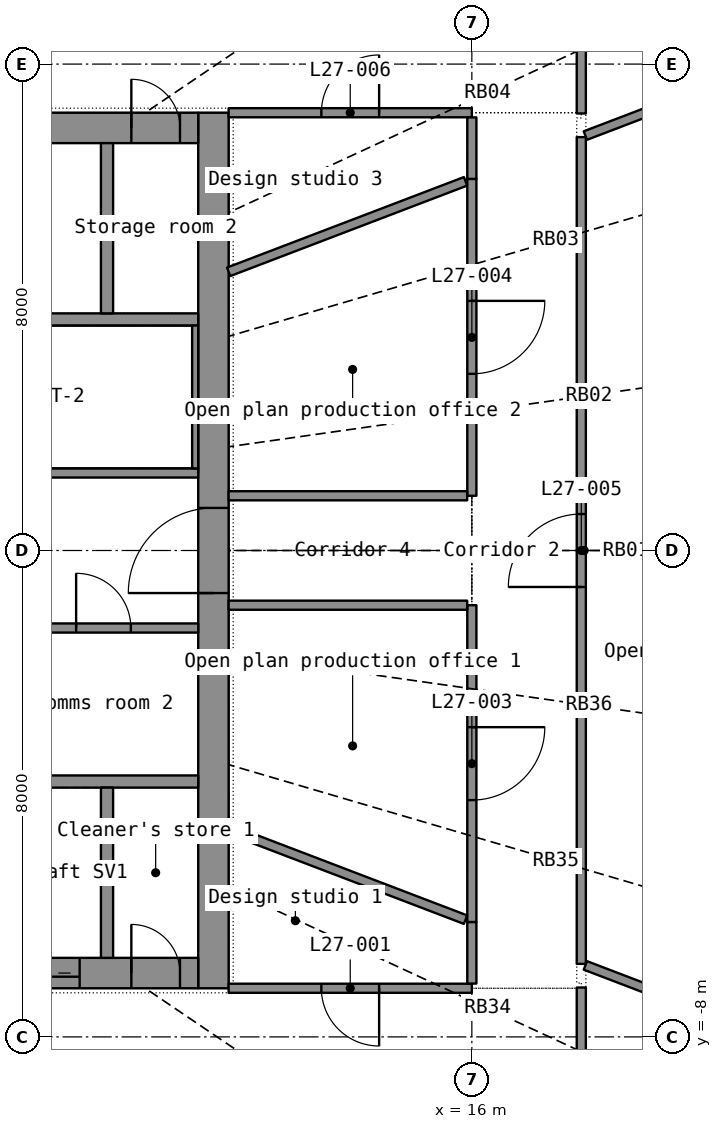
"""IFC4 building model, lengths in metres.
Left out: names, types, materials, properties, quantities, classifications, styles, units other than length and angle.
Written with IfcOpenShell. Run it as: python <this file> out.ifc"""

import sys

from ifc_helpers import new_model, si_unit, direction, frame, frame_2d, origin, place, context, subcontext, project, spatial, rectangle, extrude, element, fill, save


model = new_model("IFC4")
c1 = context("Model", 3, precision=1e-05, world=origin(), true_north=direction((0.0, 1.0)))
c2 = subcontext(c1, "Body", "Model", "MODEL_VIEW")
j1 = project(units=[si_unit("LENGTHUNIT", "METRE"), si_unit("PLANEANGLEUNIT", "RADIAN")], contexts=[c1])
p1 = place(None, origin())
s1 = spatial("IfcSite", under=j1, at=p1, CompositionType="ELEMENT")
p2 = place(p1, origin())
s2 = spatial("IfcBuilding", under=s1, at=p2, CompositionType="ELEMENT")
p3 = place(p2, frame((0.0, 0.0, 115.6)))
s3 = spatial("IfcBuildingStorey", under=s2, at=p3, CompositionType="ELEMENT", Elevation=115.6)
p4 = place(p3, frame((11.75, -7.2, 0.0), z_axis=(0.0, 0.0, 1.0), x_axis=(0.0, 1.0, 0.0)))
e1 = element("IfcWall", 1, at=p4, inside=s3, PredefinedType="SHEAR", context=c2, shape_type="SweptSolid", body=[
    extrude(rectangle(XDim=14.4, YDim=0.5, at=frame_2d((7.2, 0.0))), origin(), (0.0, 0.0, 1.0), 3.3),
])
p5 = place(p4, frame((6.5, 0.0, 0.0)))
e2 = element("IfcOpeningElement", 2, at=p5, cuts=e1, PredefinedType="OPENING", context=c2, shape_type="SweptSolid", body=[
    extrude(rectangle(XDim=1.4, YDim=2.2, at=frame_2d((0.7, 1.1))), frame((0.0, 0.26, 0.0), z_axis=(0.0, -1.0, 0.0), x_axis=(1.0, 0.0, 0.0)), (0.0, 0.0, 1.0), 0.52),
])
p6 = place(p3, frame((-11.5, -6.95, 0.0), z_axis=(0.0, 0.0, 1.0), x_axis=(1.0, 0.0, 0.0)))
e3 = element("IfcWall", 3, at=p6, inside=s3, PredefinedType="SHEAR", context=c2, shape_type="SweptSolid", body=[
    extrude(rectangle(XDim=23.0, YDim=0.5, at=frame_2d((11.5, 0.0))), origin(), (0.0, 0.0, 1.0), 3.3),
])
p7 = place(p6, frame((1.95, 0.0, 0.0)))
e4 = element("IfcOpeningElement", 4, at=p7, cuts=e3, PredefinedType="OPENING", context=c2, shape_type="SweptSolid", body=[
    extrude(rectangle(XDim=1.1, YDim=2.2, at=frame_2d((0.55, 1.1))), frame((0.0, 0.26, 0.0), z_axis=(0.0, -1.0, 0.0), x_axis=(1.0, 0.0, 0.0)), (0.0, 0.0, 1.0), 0.52),
])
p8 = place(p6, frame((3.95, 0.0, 0.0)))
e5 = element("IfcOpeningElement", 5, at=p8, cuts=e3, PredefinedType="OPENING", context=c2, shape_type="SweptSolid", body=[
    extrude(rectangle(XDim=1.1, YDim=2.2, at=frame_2d((0.55, 1.1))), frame((0.0, 0.26, 0.0), z_axis=(0.0, -1.0, 0.0), x_axis=(1.0, 0.0, 0.0)), (0.0, 0.0, 1.0), 0.52),
])
p9 = place(p6, frame((5.95, 0.0, 0.0)))
e6 = element("IfcOpeningElement", 6, at=p9, cuts=e3, PredefinedType="OPENING", context=c2, shape_type="SweptSolid", body=[
    extrude(rectangle(XDim=1.1, YDim=2.2, at=frame_2d((0.55, 1.1))), frame((0.0, 0.26, 0.0), z_axis=(0.0, -1.0, 0.0), x_axis=(1.0, 0.0, 0.0)), (0.0, 0.0, 1.0), 0.52),
])
p10 = place(p6, frame((7.95, 0.0, 0.0)))
e7 = element("IfcOpeningElement", 7, at=p10, cuts=e3, PredefinedType="OPENING", context=c2, shape_type="SweptSolid", body=[
    extrude(rectangle(XDim=1.1, YDim=2.2, at=frame_2d((0.55, 1.1))), frame((0.0, 0.26, 0.0), z_axis=(0.0, -1.0, 0.0), x_axis=(1.0, 0.0, 0.0)), (0.0, 0.0, 1.0), 0.52),
])
p11 = place(p6, frame((9.95, 0.0, 0.0)))
e8 = element("IfcOpeningElement", 8, at=p11, cuts=e3, PredefinedType="OPENING", context=c2, shape_type="SweptSolid", body=[
    extrude(rectangle(XDim=1.1, YDim=2.2, at=frame_2d((0.55, 1.1))), frame((0.0, 0.26, 0.0), z_axis=(0.0, -1.0, 0.0), x_axis=(1.0, 0.0, 0.0)), (0.0, 0.0, 1.0), 0.52),
])
p12 = place(p6, frame((11.95, 0.0, 0.0)))
e9 = element("IfcOpeningElement", 9, at=p12, cuts=e3, PredefinedType="OPENING", context=c2, shape_type="SweptSolid", body=[
    extrude(rectangle(XDim=1.1, YDim=2.2, at=frame_2d((0.55, 1.1))), frame((0.0, 0.26, 0.0), z_axis=(0.0, -1.0, 0.0), x_axis=(1.0, 0.0, 0.0)), (0.0, 0.0, 1.0), 0.52),
])
p13 = place(p6, frame((13.95, 0.0, 0.0)))
e10 = element("IfcOpeningElement", 10, at=p13, cuts=e3, PredefinedType="OPENING", context=c2, shape_type="SweptSolid", body=[
    extrude(rectangle(XDim=1.1, YDim=2.2, at=frame_2d((0.55, 1.1))), frame((0.0, 0.26, 0.0), z_axis=(0.0, -1.0, 0.0), x_axis=(1.0, 0.0, 0.0)), (0.0, 0.0, 1.0), 0.52),
])
p14 = place(p6, frame((15.95, 0.0, 0.0)))
e11 = element("IfcOpeningElement", 11, at=p14, cuts=e3, PredefinedType="OPENING", context=c2, shape_type="SweptSolid", body=[
    extrude(rectangle(XDim=1.1, YDim=2.2, at=frame_2d((0.55, 1.1))), frame((0.0, 0.26, 0.0), z_axis=(0.0, -1.0, 0.0), x_axis=(1.0, 0.0, 0.0)), (0.0, 0.0, 1.0), 0.52),
])
p15 = place(p6, frame((19.95, 0.0, 0.0)))
e12 = element("IfcOpeningElement", 12, at=p15, cuts=e3, PredefinedType="OPENING", context=c2, shape_type="SweptSolid", body=[
    extrude(rectangle(XDim=1.1, YDim=2.2, at=frame_2d((0.55, 1.1))), frame((0.0, 0.26, 0.0), z_axis=(0.0, -1.0, 0.0), x_axis=(1.0, 0.0, 0.0)), (0.0, 0.0, 1.0), 0.52),
])
p16 = place(p6, frame((0.3, 0.0, 0.0)))
e13 = element("IfcOpeningElement", 13, at=p16, cuts=e3, PredefinedType="OPENING", context=c2, shape_type="SweptSolid", body=[
    extrude(rectangle(XDim=0.8, YDim=2.05, at=frame_2d((0.4, 1.025))), frame((0.0, 0.26, 0.0), z_axis=(0.0, -1.0, 0.0), x_axis=(1.0, 0.0, 0.0)), (0.0, 0.0, 1.0), 0.52),
])
p17 = place(p6, frame((21.9, 0.0, 0.0)))
e14 = element("IfcOpeningElement", 14, at=p17, cuts=e3, PredefinedType="OPENING", context=c2, shape_type="SweptSolid", body=[
    extrude(rectangle(XDim=0.8, YDim=2.05, at=frame_2d((0.4, 1.025))), frame((0.0, 0.26, 0.0), z_axis=(0.0, -1.0, 0.0), x_axis=(1.0, 0.0, 0.0)), (0.0, 0.0, 1.0), 0.52),
])
p18 = place(p3, frame((-11.5, 6.95, 0.0), z_axis=(0.0, 0.0, 1.0), x_axis=(1.0, 0.0, 0.0)))
e15 = element("IfcWall", 15, at=p18, inside=s3, PredefinedType="SHEAR", context=c2, shape_type="SweptSolid", body=[
    extrude(rectangle(XDim=23.0, YDim=0.5, at=frame_2d((11.5, 0.0))), origin(), (0.0, 0.0, 1.0), 3.3),
])
p19 = place(p18, frame((1.95, 0.0, 0.0)))
e16 = element("IfcOpeningElement", 16, at=p19, cuts=e15, PredefinedType="OPENING", context=c2, shape_type="SweptSolid", body=[
    extrude(rectangle(XDim=1.1, YDim=2.2, at=frame_2d((0.55, 1.1))), frame((0.0, 0.26, 0.0), z_axis=(0.0, -1.0, 0.0), x_axis=(1.0, 0.0, 0.0)), (0.0, 0.0, 1.0), 0.52),
])
p20 = place(p18, frame((8.05, 0.0, 0.0)))
e17 = element("IfcOpeningElement", 17, at=p20, cuts=e15, PredefinedType="OPENING", context=c2, shape_type="SweptSolid", body=[
    extrude(rectangle(XDim=0.9, YDim=2.1, at=frame_2d((0.45, 1.05))), frame((0.0, 0.26, 0.0), z_axis=(0.0, -1.0, 0.0), x_axis=(1.0, 0.0, 0.0)), (0.0, 0.0, 1.0), 0.52),
])
p21 = place(p18, frame((13.05, 0.0, 0.0)))
e18 = element("IfcOpeningElement", 18, at=p21, cuts=e15, PredefinedType="OPENING", context=c2, shape_type="SweptSolid", body=[
    extrude(rectangle(XDim=0.9, YDim=2.1, at=frame_2d((0.45, 1.05))), frame((0.0, 0.26, 0.0), z_axis=(0.0, -1.0, 0.0), x_axis=(1.0, 0.0, 0.0)), (0.0, 0.0, 1.0), 0.52),
])
p22 = place(p18, frame((18.05, 0.0, 0.0)))
e19 = element("IfcOpeningElement", 19, at=p22, cuts=e15, PredefinedType="OPENING", context=c2, shape_type="SweptSolid", body=[
    extrude(rectangle(XDim=0.9, YDim=2.1, at=frame_2d((0.45, 1.05))), frame((0.0, 0.26, 0.0), z_axis=(0.0, -1.0, 0.0), x_axis=(1.0, 0.0, 0.0)), (0.0, 0.0, 1.0), 0.52),
])
p23 = place(p18, frame((0.3, 0.0, 0.0)))
e20 = element("IfcOpeningElement", 20, at=p23, cuts=e15, PredefinedType="OPENING", context=c2, shape_type="SweptSolid", body=[
    extrude(rectangle(XDim=0.8, YDim=2.05, at=frame_2d((0.4, 1.025))), frame((0.0, 0.26, 0.0), z_axis=(0.0, -1.0, 0.0), x_axis=(1.0, 0.0, 0.0)), (0.0, 0.0, 1.0), 0.52),
])
p24 = place(p18, frame((21.9, 0.0, 0.0)))
e21 = element("IfcOpeningElement", 21, at=p24, cuts=e15, PredefinedType="OPENING", context=c2, shape_type="SweptSolid", body=[
    extrude(rectangle(XDim=0.8, YDim=2.05, at=frame_2d((0.4, 1.025))), frame((0.0, 0.26, 0.0), z_axis=(0.0, -1.0, 0.0), x_axis=(1.0, 0.0, 0.0)), (0.0, 0.0, 1.0), 0.52),
])
for number, where, z_axis, x_axis in (
    (22, (-11.5, -3.8, 0.0), (0.0, 0.0, 1.0), (1.0, 0.0, 0.0)),
    (23, (-11.5, 3.8, 0.0), (0.0, 0.0, 1.0), (1.0, 0.0, 0.0)),
):
    element("IfcWall", number, at=place(p3, frame(where, z_axis=z_axis, x_axis=x_axis)), inside=s3, PredefinedType="SHEAR", context=c2, shape_type="SweptSolid", body=[
        extrude(rectangle(XDim=23.0, YDim=0.2, at=frame_2d((11.5, 0.0))), origin(), (0.0, 0.0, 1.0), 3.3),
    ])
for number, where, z_axis, x_axis in (
    (24, (10.0, -6.7, 0.0), (0.0, 0.0, 1.0), (0.0, 1.0, 0.0)),
    (25, (10.0, 3.9, 0.0), (0.0, 0.0, 1.0), (0.0, 1.0, 0.0)),
):
    element("IfcWall", number, at=place(p3, frame(where, z_axis=z_axis, x_axis=x_axis)), inside=s3, PredefinedType="SHEAR", context=c2, shape_type="SweptSolid", body=[
        extrude(rectangle(XDim=2.8, YDim=0.2, at=frame_2d((1.4, 0.0))), origin(), (0.0, 0.0, 1.0), 3.3),
    ])
p25 = place(p3, frame((3.0, -1.275, 0.0), z_axis=(0.0, 0.0, 1.0), x_axis=(1.0, 0.0, 0.0)))
e26 = element("IfcWall", 26, at=p25, inside=s3, PredefinedType="PARTITIONING", context=c2, shape_type="SweptSolid", body=[
    extrude(rectangle(XDim=8.5, YDim=0.15, at=frame_2d((4.25, 0.0))), origin(), (0.0, 0.0, 1.0), 3.3),
])
p26 = place(p25, frame((0.969, 0.0, 0.0)))
e27 = element("IfcOpeningElement", 27, at=p26, cuts=e26, PredefinedType="OPENING", context=c2, shape_type="SweptSolid", body=[
    extrude(rectangle(XDim=0.85, YDim=2.1, at=frame_2d((0.425, 1.05))), frame((0.0, 0.085, 0.0), z_axis=(0.0, -1.0, 0.0), x_axis=(1.0, 0.0, 0.0)), (0.0, 0.0, 1.0), 0.17),
])
p27 = place(p25, frame((3.661, 0.0, 0.0)))
e28 = element("IfcOpeningElement", 28, at=p27, cuts=e26, PredefinedType="OPENING", context=c2, shape_type="SweptSolid", body=[
    extrude(rectangle(XDim=0.85, YDim=2.1, at=frame_2d((0.425, 1.05))), frame((0.0, 0.085, 0.0), z_axis=(0.0, -1.0, 0.0), x_axis=(1.0, 0.0, 0.0)), (0.0, 0.0, 1.0), 0.17),
])
p28 = place(p25, frame((6.492, 0.0, 0.0)))
e29 = element("IfcOpeningElement", 29, at=p28, cuts=e26, PredefinedType="OPENING", context=c2, shape_type="SweptSolid", body=[
    extrude(rectangle(XDim=0.9, YDim=2.1, at=frame_2d((0.45, 1.05))), frame((0.0, 0.085, 0.0), z_axis=(0.0, -1.0, 0.0), x_axis=(1.0, 0.0, 0.0)), (0.0, 0.0, 1.0), 0.17),
])
p29 = place(p3, frame((3.0, 1.275, 0.0), z_axis=(0.0, 0.0, 1.0), x_axis=(1.0, 0.0, 0.0)))
e30 = element("IfcWall", 30, at=p29, inside=s3, PredefinedType="SHEAR", context=c2, shape_type="SweptSolid", body=[
    extrude(rectangle(XDim=8.5, YDim=0.15, at=frame_2d((4.25, 0.0))), origin(), (0.0, 0.0, 1.0), 3.3),
])
p30 = place(p29, frame((2.05, 0.0, 0.0)))
e31 = element("IfcOpeningElement", 31, at=p30, cuts=e30, PredefinedType="OPENING", context=c2, shape_type="SweptSolid", body=[
    extrude(rectangle(XDim=1.1, YDim=2.15, at=frame_2d((0.55, 1.075))), frame((0.0, 0.085, 0.0), z_axis=(0.0, -1.0, 0.0), x_axis=(1.0, 0.0, 0.0)), (0.0, 0.0, 1.0), 0.17),
])
p31 = place(p29, frame((0.45, 0.0, 0.0)))
e32 = element("IfcOpeningElement", 32, at=p31, cuts=e30, PredefinedType="OPENING", context=c2, shape_type="SweptSolid", body=[
    extrude(rectangle(XDim=0.9, YDim=2.1, at=frame_2d((0.45, 1.05))), frame((0.0, 0.085, 0.0), z_axis=(0.0, -1.0, 0.0), x_axis=(1.0, 0.0, 0.0)), (0.0, 0.0, 1.0), 0.17),
])
p32 = place(p3, frame((11.45, 1.35, 0.0), z_axis=(0.0, 0.0, 1.0), x_axis=(0.0, 1.0, 0.0)))
e33 = element("IfcWall", 33, at=p32, inside=s3, PredefinedType="SHEAR", context=c2, shape_type="SweptSolid", body=[
    extrude(rectangle(XDim=2.35, YDim=0.1, at=frame_2d((1.175, 0.0))), origin(), (0.0, 0.0, 1.0), 3.3),
])
p33 = place(p3, frame((17.8, -6.799, 0.0), z_axis=(0.0, 0.0, 1.0), x_axis=(0.0, 1.0, 0.0)))
e34 = element("IfcWall", 34, at=p33, inside=s3, PredefinedType="PARTITIONING", context=c2, shape_type="SweptSolid", body=[
    extrude(rectangle(XDim=13.598, YDim=0.15, at=frame_2d((6.799, 0.0))), origin(), (0.0, 0.0, 1.0), 2.4),
])
p34 = place(p33, frame((6.199, 0.0, 0.0)))
e35 = element("IfcOpeningElement", 35, at=p34, cuts=e34, PredefinedType="OPENING", context=c2, shape_type="SweptSolid", body=[
    extrude(rectangle(XDim=1.2, YDim=2.2, at=frame_2d((0.6, 1.1))), frame((0.0, 0.085, 0.0), z_axis=(0.0, -1.0, 0.0), x_axis=(1.0, 0.0, 0.0)), (0.0, 0.0, 1.0), 0.17),
])
p35 = place(p3, frame((23.094, -8.821, 0.0), z_axis=(0.0, 0.0, 1.0), x_axis=(-0.934174226, 0.356817201, 0.0)))
e36 = element("IfcWall", 36, at=p35, inside=s3, PredefinedType="PARTITIONING", context=c2, shape_type="SweptSolid", body=[
    extrude(rectangle(XDim=5.595, YDim=0.15, at=frame_2d((2.797, 0.0))), origin(), (0.0, 0.0, 1.0), 2.4),
])
p36 = place(p3, frame((23.092, 8.82, 0.0), z_axis=(0.0, 0.0, 1.0), x_axis=(-0.934164423, -0.356842865, 0.0)))
e37 = element("IfcWall", 37, at=p36, inside=s3, PredefinedType="PARTITIONING", context=c2, shape_type="SweptSolid", body=[
    extrude(rectangle(XDim=5.593, YDim=0.15, at=frame_2d((2.796, 0.0))), origin(), (0.0, 0.0, 1.0), 2.4),
])
p37 = place(p3, frame((16.0, -0.9, 0.0), z_axis=(0.0, 0.0, 1.0), x_axis=(0.0, -1.0, 0.0)))
e38 = element("IfcWall", 38, at=p37, inside=s3, PredefinedType="PARTITIONING", context=c2, shape_type="SweptSolid", body=[
    extrude(rectangle(XDim=5.211, YDim=0.15, at=frame_2d((2.606, 0.0))), origin(), (0.0, 0.0, 1.0), 2.4),
])
p38 = place(p37, frame((2.006, 0.0, 0.0)))
e39 = element("IfcOpeningElement", 39, at=p38, cuts=e38, PredefinedType="OPENING", context=c2, shape_type="SweptSolid", body=[
    extrude(rectangle(XDim=1.2, YDim=2.2, at=frame_2d((0.6, 1.1))), frame((0.0, 0.085, 0.0), z_axis=(0.0, -1.0, 0.0), x_axis=(1.0, 0.0, 0.0)), (0.0, 0.0, 1.0), 0.17),
])
p39 = place(p3, frame((16.0, 6.111, 0.0), z_axis=(0.0, 0.0, 1.0), x_axis=(0.0, -1.0, 0.0)))
e40 = element("IfcWall", 40, at=p39, inside=s3, PredefinedType="PARTITIONING", context=c2, shape_type="SweptSolid", body=[
    extrude(rectangle(XDim=5.211, YDim=0.15, at=frame_2d((2.606, 0.0))), origin(), (0.0, 0.0, 1.0), 2.4),
])
p40 = place(p39, frame((2.006, 0.0, 0.0)))
e41 = element("IfcOpeningElement", 41, at=p40, cuts=e40, PredefinedType="OPENING", context=c2, shape_type="SweptSolid", body=[
    extrude(rectangle(XDim=1.2, YDim=2.2, at=frame_2d((0.6, 1.1))), frame((0.0, 0.085, 0.0), z_axis=(0.0, -1.0, 0.0), x_axis=(1.0, 0.0, 0.0)), (0.0, 0.0, 1.0), 0.17),
])
for number, where, z_axis, x_axis in (
    (42, (15.896, -6.072, 0.0), (0.0, 0.0, 1.0), (-0.934, 0.357, 0.0)),
    (43, (15.896, 6.072, 0.0), (0.0, 0.0, 1.0), (-0.934, -0.357, 0.0)),
):
    element("IfcWall", number, at=place(p3, frame(where, z_axis=z_axis, x_axis=x_axis)), inside=s3, PredefinedType="PARTITIONING", context=c2, shape_type="SweptSolid", body=[
        extrude(rectangle(XDim=4.171, YDim=0.15, at=frame_2d((2.085, 0.0))), origin(), (0.0, 0.0, 1.0), 2.4),
    ])
p41 = place(p3, frame((12.0, -0.9, 0.0), z_axis=(0.0, 0.0, 1.0), x_axis=(1.0, 0.0, 0.0)))
e44 = element("IfcWall", 44, at=p41, inside=s3, PredefinedType="PARTITIONING", context=c2, shape_type="SweptSolid", body=[
    extrude(rectangle(XDim=3.923, YDim=0.15, at=frame_2d((1.961, 0.0))), origin(), (0.0, 0.0, 1.0), 2.4),
])
p42 = place(p3, frame((12.0, 7.2, 0.0), z_axis=(0.0, 0.0, 1.0), x_axis=(1.0, 0.0, 0.0)))
e45 = element("IfcWall", 45, at=p42, inside=s3, PredefinedType="PARTITIONING", context=c2, shape_type="SweptSolid", body=[
    extrude(rectangle(XDim=4.0, YDim=0.15, at=frame_2d((2.0, 0.0))), origin(), (0.0, 0.0, 1.0), 2.4),
])
p43 = place(p42, frame((1.525, 0.0, 0.0)))
e46 = element("IfcOpeningElement", 46, at=p43, cuts=e45, PredefinedType="OPENING", context=c2, shape_type="SweptSolid", body=[
    extrude(rectangle(XDim=0.95, YDim=2.15, at=frame_2d((0.475, 1.075))), frame((0.0, 0.085, 0.0), z_axis=(0.0, -1.0, 0.0), x_axis=(1.0, 0.0, 0.0)), (0.0, 0.0, 1.0), 0.17),
])
p44 = place(p3, frame((16.0, -7.2, 0.0), z_axis=(0.0, 0.0, 1.0), x_axis=(-1.0, 0.0, 0.0)))
e47 = element("IfcWall", 47, at=p44, inside=s3, PredefinedType="PARTITIONING", context=c2, shape_type="SweptSolid", body=[
    extrude(rectangle(XDim=4.0, YDim=0.15, at=frame_2d((2.0, 0.0))), origin(), (0.0, 0.0, 1.0), 2.4),
])
p45 = place(p44, frame((1.525, 0.0, 0.0)))
e48 = element("IfcOpeningElement", 48, at=p45, cuts=e47, PredefinedType="OPENING", context=c2, shape_type="SweptSolid", body=[
    extrude(rectangle(XDim=0.95, YDim=2.15, at=frame_2d((0.475, 1.075))), frame((0.0, 0.085, 0.0), z_axis=(0.0, -1.0, 0.0), x_axis=(1.0, 0.0, 0.0)), (0.0, 0.0, 1.0), 0.17),
])
p46 = place(p3, frame((15.923, 0.9, 0.0), z_axis=(0.0, 0.0, 1.0), x_axis=(-1.0, 0.0, 0.0)))
e49 = element("IfcWall", 49, at=p46, inside=s3, PredefinedType="PARTITIONING", context=c2, shape_type="SweptSolid", body=[
    extrude(rectangle(XDim=3.923, YDim=0.15, at=frame_2d((1.961, 0.0))), origin(), (0.0, 0.0, 1.0), 2.4),
])
p47 = place(p3, frame((17.8, 7.188, 0.0), z_axis=(0.0, 0.0, 1.0), x_axis=(0.0, 1.0, 0.0)))
e50 = element("IfcWall", 50, at=p47, inside=s3, PredefinedType="PARTITIONING", context=c2, shape_type="SweptSolid", body=[
    extrude(rectangle(XDim=3.535, YDim=0.15, at=frame_2d((1.768, 0.0))), origin(), (0.0, 0.0, 1.0), 2.4),
])
p48 = place(p3, frame((17.8, -9.523, 0.0), z_axis=(0.0, 0.0, 1.0), x_axis=(0.0, 1.0, 0.0)))
e51 = element("IfcWall", 51, at=p48, inside=s3, PredefinedType="PARTITIONING", context=c2, shape_type="SweptSolid", body=[
    extrude(rectangle(XDim=2.335, YDim=0.15, at=frame_2d((1.167, 0.0))), origin(), (0.0, 0.0, 1.0), 2.4),
])
for number, where, z_axis, x_axis in (
    (52, (16.0, -6.112, 0.0), (0.0, 0.0, 1.0), (0.0, -1.0, 0.0)),
    (53, (16.0, 7.123, 0.0), (0.0, 0.0, 1.0), (0.0, -1.0, 0.0)),
):
    element("IfcWall", number, at=place(p3, frame(where, z_axis=z_axis, x_axis=x_axis)), inside=s3, PredefinedType="PARTITIONING", context=c2, shape_type="SweptSolid", body=[
        extrude(rectangle(XDim=1.011, YDim=0.15, at=frame_2d((0.505, 0.0))), origin(), (0.0, 0.0, 1.0), 2.4),
    ])
p49 = place(p15, origin())
e54 = element("IfcDoor", 54, at=p49, inside=s3, OperationType="DOUBLE_DOOR_SLIDING", PredefinedType="DOOR", context=c2, shape_type="SweptSolid", body=[
    extrude(rectangle(XDim=1.1, YDim=2.2, at=frame_2d((0.55, 1.1))), frame((0.0, 0.025, 0.0), z_axis=(0.0, -1.0, 0.0), x_axis=(1.0, 0.0, 0.0)), (0.0, 0.0, 1.0), 0.05),
])
fill(e12, e54)
p50 = place(p17, origin())
e55 = element("IfcDoor", 55, at=p50, inside=s3, OperationType="SINGLE_SWING_LEFT", PredefinedType="DOOR", context=c2, shape_type="SweptSolid", body=[
    extrude(rectangle(XDim=0.8, YDim=2.05, at=frame_2d((0.4, 1.025))), frame((0.0, 0.025, 0.0), z_axis=(0.0, -1.0, 0.0), x_axis=(1.0, 0.0, 0.0)), (0.0, 0.0, 1.0), 0.05),
])
fill(e14, e55)
p51 = place(p24, origin())
e56 = element("IfcDoor", 56, at=p51, inside=s3, OperationType="SINGLE_SWING_LEFT", PredefinedType="DOOR", context=c2, shape_type="SweptSolid", body=[
    extrude(rectangle(XDim=0.8, YDim=2.05, at=frame_2d((0.4, 1.025))), frame((0.0, 0.025, 0.0), z_axis=(0.0, -1.0, 0.0), x_axis=(1.0, 0.0, 0.0)), (0.0, 0.0, 1.0), 0.05),
])
fill(e21, e56)
p52 = place(p5, origin())
e57 = element("IfcDoor", 57, at=p52, inside=s3, OperationType="DOUBLE_DOOR_SINGLE_SWING", PredefinedType="DOOR", context=c2, shape_type="SweptSolid", body=[
    extrude(rectangle(XDim=1.4, YDim=2.2, at=frame_2d((0.7, 1.1))), frame((0.0, 0.025, 0.0), z_axis=(0.0, -1.0, 0.0), x_axis=(1.0, 0.0, 0.0)), (0.0, 0.0, 1.0), 0.05),
])
fill(e2, e57)
p53 = place(p28, origin())
e58 = element("IfcDoor", 58, at=p53, inside=s3, OperationType="SINGLE_SWING_LEFT", PredefinedType="DOOR", context=c2, shape_type="SweptSolid", body=[
    extrude(rectangle(XDim=0.9, YDim=2.1, at=frame_2d((0.45, 1.05))), frame((0.0, 0.025, 0.0), z_axis=(0.0, -1.0, 0.0), x_axis=(1.0, 0.0, 0.0)), (0.0, 0.0, 1.0), 0.05),
])
fill(e29, e58)
p54 = place(p45, origin())
e59 = element("IfcDoor", 59, at=p54, inside=s3, OperationType="SINGLE_SWING_LEFT", PredefinedType="DOOR", context=c2, shape_type="SweptSolid", body=[
    extrude(rectangle(XDim=0.95, YDim=2.15, at=frame_2d((0.475, 1.075))), frame((0.0, 0.025, 0.0), z_axis=(0.0, -1.0, 0.0), x_axis=(1.0, 0.0, 0.0)), (0.0, 0.0, 1.0), 0.05),
])
fill(e48, e59)
p55 = place(p38, origin())
e60 = element("IfcDoor", 60, at=p55, inside=s3, OperationType="DOUBLE_DOOR_SINGLE_SWING", PredefinedType="DOOR", context=c2, shape_type="SweptSolid", body=[
    extrude(rectangle(XDim=1.2, YDim=2.2, at=frame_2d((0.6, 1.1))), frame((0.0, 0.025, 0.0), z_axis=(0.0, -1.0, 0.0), x_axis=(1.0, 0.0, 0.0)), (0.0, 0.0, 1.0), 0.05),
])
fill(e39, e60)
p56 = place(p40, origin())
e61 = element("IfcDoor", 61, at=p56, inside=s3, OperationType="DOUBLE_DOOR_SINGLE_SWING", PredefinedType="DOOR", context=c2, shape_type="SweptSolid", body=[
    extrude(rectangle(XDim=1.2, YDim=2.2, at=frame_2d((0.6, 1.1))), frame((0.0, 0.025, 0.0), z_axis=(0.0, -1.0, 0.0), x_axis=(1.0, 0.0, 0.0)), (0.0, 0.0, 1.0), 0.05),
])
fill(e41, e61)
p57 = place(p34, origin())
e62 = element("IfcDoor", 62, at=p57, inside=s3, OperationType="DOUBLE_DOOR_SINGLE_SWING", PredefinedType="DOOR", context=c2, shape_type="SweptSolid", body=[
    extrude(rectangle(XDim=1.2, YDim=2.2, at=frame_2d((0.6, 1.1))), frame((0.0, 0.025, 0.0), z_axis=(0.0, -1.0, 0.0), x_axis=(1.0, 0.0, 0.0)), (0.0, 0.0, 1.0), 0.05),
])
fill(e35, e62)
p58 = place(p43, origin())
e63 = element("IfcDoor", 63, at=p58, inside=s3, OperationType="SINGLE_SWING_RIGHT", PredefinedType="DOOR", context=c2, shape_type="SweptSolid", body=[
    extrude(rectangle(XDim=0.95, YDim=2.15, at=frame_2d((0.475, 1.075))), frame((0.0, 0.025, 0.0), z_axis=(0.0, -1.0, 0.0), x_axis=(1.0, 0.0, 0.0)), (0.0, 0.0, 1.0), 0.05),
])
fill(e46, e63)
save(model, sys.argv[1])
